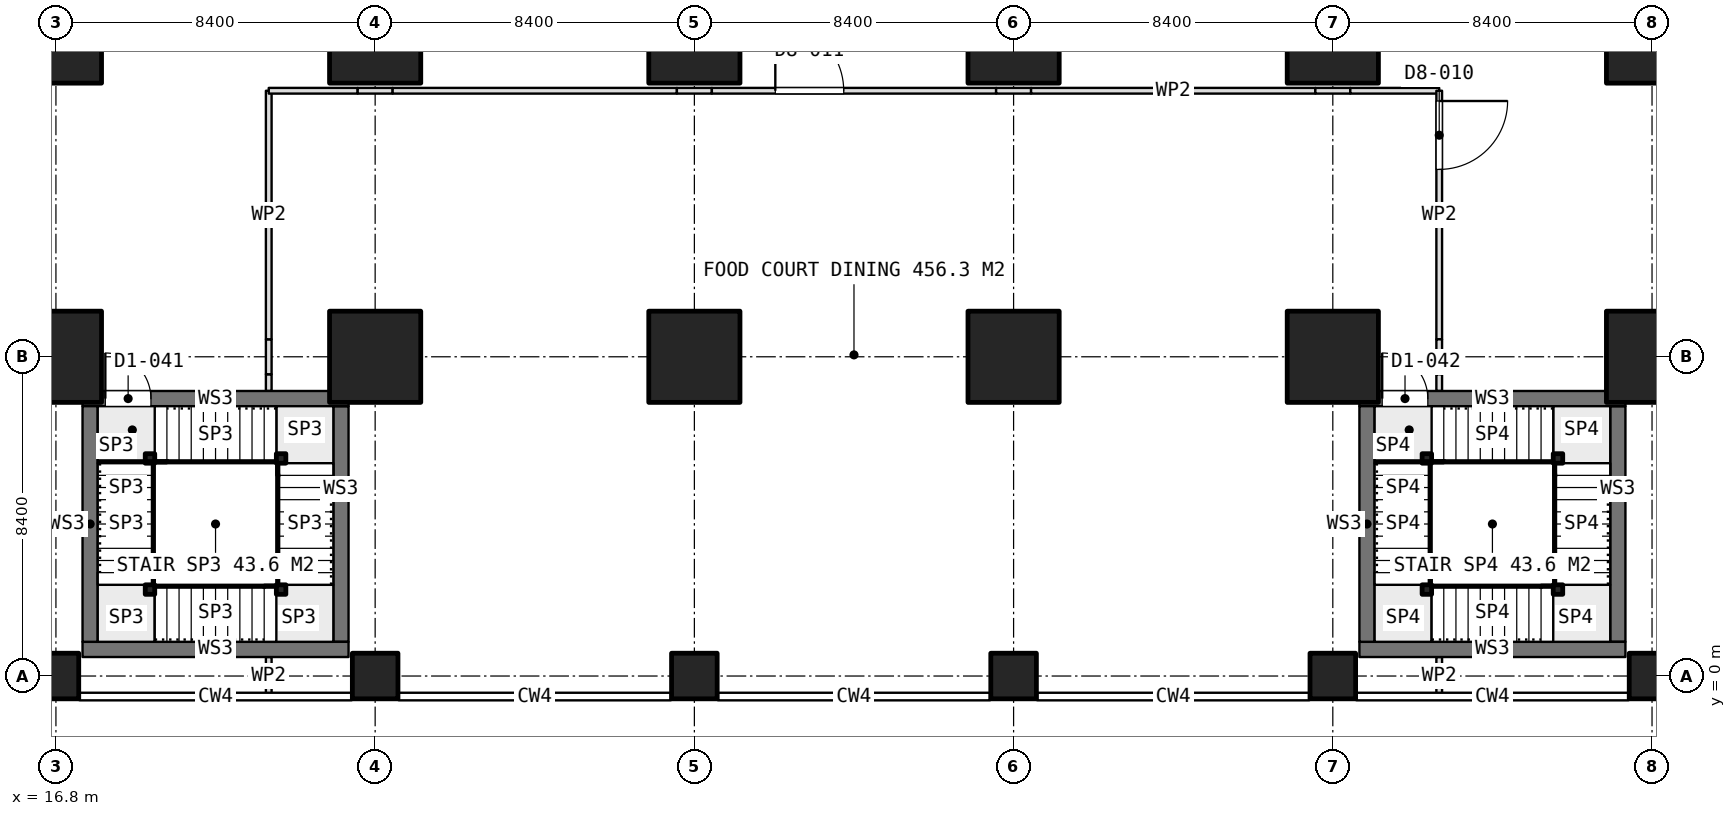
"""IFC4 building model, lengths in metres.
Left out: names, types, materials, properties, quantities, classifications, styles, units other than length and angle.
Written with IfcOpenShell. Run it as: python <this file> out.ifc"""

import sys

from ifc_helpers import new_model, si_unit, direction, frame, frame_2d, origin, origin_2d, place, context, subcontext, project, spatial, rectangle, extrude, element, fill, save


model = new_model("IFC4")
c1 = context("Model", 3, precision=1e-05, world=origin(), true_north=direction((0.0, 1.0)))
c2 = subcontext(c1, "Body", "Model", "MODEL_VIEW")
j1 = project(units=[si_unit("LENGTHUNIT", "METRE"), si_unit("PLANEANGLEUNIT", "RADIAN")], contexts=[c1])
p1 = place(None, origin())
s1 = spatial("IfcSite", under=j1, at=p1, CompositionType="ELEMENT")
p2 = place(p1, origin())
s2 = spatial("IfcBuilding", under=s1, at=p2, CompositionType="ELEMENT")
p3 = place(p2, frame((0.0, 0.0, 15.4)))
s3 = spatial("IfcBuildingStorey", under=s2, at=p3, CompositionType="ELEMENT", Elevation=15.4)
p4 = place(p3, frame((16.8, 0.0, 0.0), z_axis=(0.0, 0.0, 1.0), x_axis=(1.0, 0.0, 0.0)))
e1 = element("IfcColumn", 1, at=p4, inside=s3, PredefinedType="COLUMN", context=c2, shape_type="SweptSolid", body=[
    extrude(rectangle(XDim=1.2, YDim=1.2, at=origin_2d()), origin(), (0.0, 0.0, 1.0), 5.0),
])
for number, where, z_axis, x_axis in (
    (2, (16.8, 8.4, 0.0), (0.0, 0.0, 1.0), (1.0, 0.0, 0.0)),
    (3, (16.8, 16.8, 0.0), (0.0, 0.0, 1.0), (1.0, 0.0, 0.0)),
):
    element("IfcColumn", number, at=place(p3, frame(where, z_axis=z_axis, x_axis=x_axis)), inside=s3, PredefinedType="COLUMN", context=c2, shape_type="SweptSolid", body=[
        extrude(rectangle(XDim=2.4, YDim=2.4, at=origin_2d()), origin(), (0.0, 0.0, 1.0), 5.0),
    ])
p5 = place(p3, frame((25.2, 0.0, 0.0), z_axis=(0.0, 0.0, 1.0), x_axis=(1.0, 0.0, 0.0)))
e4 = element("IfcColumn", 4, at=p5, inside=s3, PredefinedType="COLUMN", context=c2, shape_type="SweptSolid", body=[
    extrude(rectangle(XDim=1.2, YDim=1.2, at=origin_2d()), origin(), (0.0, 0.0, 1.0), 5.0),
])
for number, where, z_axis, x_axis in (
    (5, (25.2, 8.4, 0.0), (0.0, 0.0, 1.0), (1.0, 0.0, 0.0)),
    (6, (25.2, 16.8, 0.0), (0.0, 0.0, 1.0), (1.0, 0.0, 0.0)),
):
    element("IfcColumn", number, at=place(p3, frame(where, z_axis=z_axis, x_axis=x_axis)), inside=s3, PredefinedType="COLUMN", context=c2, shape_type="SweptSolid", body=[
        extrude(rectangle(XDim=2.4, YDim=2.4, at=origin_2d()), origin(), (0.0, 0.0, 1.0), 5.0),
    ])
p6 = place(p3, frame((33.6, 0.0, 0.0), z_axis=(0.0, 0.0, 1.0), x_axis=(1.0, 0.0, 0.0)))
e7 = element("IfcColumn", 7, at=p6, inside=s3, PredefinedType="COLUMN", context=c2, shape_type="SweptSolid", body=[
    extrude(rectangle(XDim=1.2, YDim=1.2, at=origin_2d()), origin(), (0.0, 0.0, 1.0), 5.0),
])
for number, where, z_axis, x_axis in (
    (8, (33.6, 8.4, 0.0), (0.0, 0.0, 1.0), (1.0, 0.0, 0.0)),
    (9, (33.6, 16.8, 0.0), (0.0, 0.0, 1.0), (1.0, 0.0, 0.0)),
):
    element("IfcColumn", number, at=place(p3, frame(where, z_axis=z_axis, x_axis=x_axis)), inside=s3, PredefinedType="COLUMN", context=c2, shape_type="SweptSolid", body=[
        extrude(rectangle(XDim=2.4, YDim=2.4, at=origin_2d()), origin(), (0.0, 0.0, 1.0), 5.0),
    ])
p7 = place(p3, frame((42.0, 0.0, 0.0), z_axis=(0.0, 0.0, 1.0), x_axis=(1.0, 0.0, 0.0)))
e10 = element("IfcColumn", 10, at=p7, inside=s3, PredefinedType="COLUMN", context=c2, shape_type="SweptSolid", body=[
    extrude(rectangle(XDim=1.2, YDim=1.2, at=origin_2d()), origin(), (0.0, 0.0, 1.0), 5.0),
])
for number, where, z_axis, x_axis in (
    (11, (42.0, 8.4, 0.0), (0.0, 0.0, 1.0), (1.0, 0.0, 0.0)),
    (12, (42.0, 16.8, 0.0), (0.0, 0.0, 1.0), (1.0, 0.0, 0.0)),
):
    element("IfcColumn", number, at=place(p3, frame(where, z_axis=z_axis, x_axis=x_axis)), inside=s3, PredefinedType="COLUMN", context=c2, shape_type="SweptSolid", body=[
        extrude(rectangle(XDim=2.4, YDim=2.4, at=origin_2d()), origin(), (0.0, 0.0, 1.0), 5.0),
    ])
p8 = place(p3, frame((50.4, 0.0, 0.0), z_axis=(0.0, 0.0, 1.0), x_axis=(1.0, 0.0, 0.0)))
e13 = element("IfcColumn", 13, at=p8, inside=s3, PredefinedType="COLUMN", context=c2, shape_type="SweptSolid", body=[
    extrude(rectangle(XDim=1.2, YDim=1.2, at=origin_2d()), origin(), (0.0, 0.0, 1.0), 5.0),
])
for number, where, z_axis, x_axis in (
    (14, (50.4, 8.4, 0.0), (0.0, 0.0, 1.0), (1.0, 0.0, 0.0)),
    (15, (50.4, 16.8, 0.0), (0.0, 0.0, 1.0), (1.0, 0.0, 0.0)),
):
    element("IfcColumn", number, at=place(p3, frame(where, z_axis=z_axis, x_axis=x_axis)), inside=s3, PredefinedType="COLUMN", context=c2, shape_type="SweptSolid", body=[
        extrude(rectangle(XDim=2.4, YDim=2.4, at=origin_2d()), origin(), (0.0, 0.0, 1.0), 5.0),
    ])
p9 = place(p3, frame((58.8, 0.0, 0.0), z_axis=(0.0, 0.0, 1.0), x_axis=(1.0, 0.0, 0.0)))
e16 = element("IfcColumn", 16, at=p9, inside=s3, PredefinedType="COLUMN", context=c2, shape_type="SweptSolid", body=[
    extrude(rectangle(XDim=1.2, YDim=1.2, at=origin_2d()), origin(), (0.0, 0.0, 1.0), 5.0),
])
for number, where, z_axis, x_axis in (
    (17, (58.8, 8.4, 0.0), (0.0, 0.0, 1.0), (1.0, 0.0, 0.0)),
    (18, (58.8, 16.8, 0.0), (0.0, 0.0, 1.0), (1.0, 0.0, 0.0)),
):
    element("IfcColumn", number, at=place(p3, frame(where, z_axis=z_axis, x_axis=x_axis)), inside=s3, PredefinedType="COLUMN", context=c2, shape_type="SweptSolid", body=[
        extrude(rectangle(XDim=2.4, YDim=2.4, at=origin_2d()), origin(), (0.0, 0.0, 1.0), 5.0),
    ])
p10 = place(p3, frame((17.5, 0.7, 0.0), z_axis=(0.0, 0.0, 1.0), x_axis=(1.0, 0.0, 0.0)))
e19 = element("IfcWall", 19, at=p10, inside=s3, PredefinedType="SOLIDWALL", context=c2, shape_type="SweptSolid", body=[
    extrude(rectangle(XDim=7.0, YDim=0.4, at=frame_2d((3.5, 0.0))), origin(), (0.0, 0.0, 1.0), 4.7),
])
p11 = place(p3, frame((17.5, 7.3, 0.0), z_axis=(0.0, 0.0, 1.0), x_axis=(1.0, 0.0, 0.0)))
e20 = element("IfcWall", 20, at=p11, inside=s3, PredefinedType="SOLIDWALL", context=c2, shape_type="SweptSolid", body=[
    extrude(rectangle(XDim=7.0, YDim=0.4, at=frame_2d((3.5, 0.0))), origin(), (0.0, 0.0, 1.0), 4.7),
])
p12 = place(p11, frame((0.6, 0.0, 0.0)))
e21 = element("IfcOpeningElement", 21, at=p12, cuts=e20, PredefinedType="OPENING", context=c2, shape_type="SweptSolid", body=[
    extrude(rectangle(XDim=1.2, YDim=2.1, at=frame_2d((0.6, 1.05))), frame((0.0, 0.21, 0.0), z_axis=(0.0, -1.0, 0.0), x_axis=(1.0, 0.0, 0.0)), (0.0, 0.0, 1.0), 0.42),
])
for number, where, z_axis, x_axis in (
    (22, (17.7, 0.9, 0.0), (0.0, 0.0, 1.0), (0.0, 1.0, 0.0)),
    (23, (24.3, 0.9, 0.0), (0.0, 0.0, 1.0), (0.0, 1.0, 0.0)),
):
    element("IfcWall", number, at=place(p3, frame(where, z_axis=z_axis, x_axis=x_axis)), inside=s3, PredefinedType="SOLIDWALL", context=c2, shape_type="SweptSolid", body=[
        extrude(rectangle(XDim=6.2, YDim=0.4, at=frame_2d((3.1, 0.0))), origin(), (0.0, 0.0, 1.0), 4.7),
    ])
p13 = place(p3, frame((51.1, 0.7, 0.0), z_axis=(0.0, 0.0, 1.0), x_axis=(1.0, 0.0, 0.0)))
e24 = element("IfcWall", 24, at=p13, inside=s3, PredefinedType="SOLIDWALL", context=c2, shape_type="SweptSolid", body=[
    extrude(rectangle(XDim=7.0, YDim=0.4, at=frame_2d((3.5, 0.0))), origin(), (0.0, 0.0, 1.0), 4.7),
])
p14 = place(p3, frame((51.1, 7.3, 0.0), z_axis=(0.0, 0.0, 1.0), x_axis=(1.0, 0.0, 0.0)))
e25 = element("IfcWall", 25, at=p14, inside=s3, PredefinedType="SOLIDWALL", context=c2, shape_type="SweptSolid", body=[
    extrude(rectangle(XDim=7.0, YDim=0.4, at=frame_2d((3.5, 0.0))), origin(), (0.0, 0.0, 1.0), 4.7),
])
p15 = place(p14, frame((0.6, 0.0, 0.0)))
e26 = element("IfcOpeningElement", 26, at=p15, cuts=e25, PredefinedType="OPENING", context=c2, shape_type="SweptSolid", body=[
    extrude(rectangle(XDim=1.2, YDim=2.1, at=frame_2d((0.6, 1.05))), frame((0.0, 0.21, 0.0), z_axis=(0.0, -1.0, 0.0), x_axis=(1.0, 0.0, 0.0)), (0.0, 0.0, 1.0), 0.42),
])
for number, where, z_axis, x_axis in (
    (27, (51.3, 0.9, 0.0), (0.0, 0.0, 1.0), (0.0, 1.0, 0.0)),
    (28, (57.9, 0.9, 0.0), (0.0, 0.0, 1.0), (0.0, 1.0, 0.0)),
):
    element("IfcWall", number, at=place(p3, frame(where, z_axis=z_axis, x_axis=x_axis)), inside=s3, PredefinedType="SOLIDWALL", context=c2, shape_type="SweptSolid", body=[
        extrude(rectangle(XDim=6.2, YDim=0.4, at=frame_2d((3.1, 0.0))), origin(), (0.0, 0.0, 1.0), 4.7),
    ])
p16 = place(p3, frame((22.4, 7.5, 0.0), z_axis=(0.0, 0.0, 1.0), x_axis=(0.0, 1.0, 0.0)))
e29 = element("IfcWall", 29, at=p16, inside=s3, PredefinedType="PARTITIONING", context=c2, shape_type="SweptSolid", body=[
    extrude(rectangle(XDim=0.44, YDim=0.15, at=frame_2d((0.22, 0.0))), origin(), (0.0, 0.0, 1.0), 4.7),
])
p17 = place(p3, frame((22.4, 7.94, 0.0), z_axis=(0.0, 0.0, 1.0), x_axis=(0.0, 1.0, 0.0)))
e30 = element("IfcWall", 30, at=p17, inside=s3, PredefinedType="PARTITIONING", context=c2, shape_type="SweptSolid", body=[
    extrude(rectangle(XDim=0.92, YDim=0.15, at=frame_2d((0.46, 0.0))), origin(), (0.0, 0.0, 1.0), 2.9),
])
p18 = place(p3, frame((22.4, 8.86, 0.0), z_axis=(0.0, 0.0, 1.0), x_axis=(0.0, 1.0, 0.0)))
e31 = element("IfcWall", 31, at=p18, inside=s3, PredefinedType="PARTITIONING", context=c2, shape_type="SweptSolid", body=[
    extrude(rectangle(XDim=6.54, YDim=0.15, at=frame_2d((3.27, 0.0))), origin(), (0.0, 0.0, 1.0), 4.7),
])
p19 = place(p3, frame((22.4, 15.4, 0.0), z_axis=(0.0, 0.0, 1.0), x_axis=(1.0, 0.0, 0.0)))
e32 = element("IfcWall", 32, at=p19, inside=s3, PredefinedType="PARTITIONING", context=c2, shape_type="SweptSolid", body=[
    extrude(rectangle(XDim=2.34, YDim=0.15, at=frame_2d((1.17, 0.0))), origin(), (0.0, 0.0, 1.0), 4.7),
])
p20 = place(p3, frame((24.74, 15.4, 0.0), z_axis=(0.0, 0.0, 1.0), x_axis=(1.0, 0.0, 0.0)))
e33 = element("IfcWall", 33, at=p20, inside=s3, PredefinedType="PARTITIONING", context=c2, shape_type="SweptSolid", body=[
    extrude(rectangle(XDim=0.92, YDim=0.15, at=frame_2d((0.46, 0.0))), origin(), (0.0, 0.0, 1.0), 2.9),
])
p21 = place(p3, frame((25.66, 15.4, 0.0), z_axis=(0.0, 0.0, 1.0), x_axis=(1.0, 0.0, 0.0)))
e34 = element("IfcWall", 34, at=p21, inside=s3, PredefinedType="PARTITIONING", context=c2, shape_type="SweptSolid", body=[
    extrude(rectangle(XDim=7.48, YDim=0.15, at=frame_2d((3.74, 0.0))), origin(), (0.0, 0.0, 1.0), 4.7),
])
p22 = place(p3, frame((33.14, 15.4, 0.0), z_axis=(0.0, 0.0, 1.0), x_axis=(1.0, 0.0, 0.0)))
e35 = element("IfcWall", 35, at=p22, inside=s3, PredefinedType="PARTITIONING", context=c2, shape_type="SweptSolid", body=[
    extrude(rectangle(XDim=0.92, YDim=0.15, at=frame_2d((0.46, 0.0))), origin(), (0.0, 0.0, 1.0), 2.9),
])
p23 = place(p3, frame((34.06, 15.4, 0.0), z_axis=(0.0, 0.0, 1.0), x_axis=(1.0, 0.0, 0.0)))
e36 = element("IfcWall", 36, at=p23, inside=s3, PredefinedType="PARTITIONING", context=c2, shape_type="SweptSolid", body=[
    extrude(rectangle(XDim=7.48, YDim=0.15, at=frame_2d((3.74, 0.0))), origin(), (0.0, 0.0, 1.0), 4.7),
])
p24 = place(p23, frame((1.67, 0.0, 0.0)))
e37 = element("IfcOpeningElement", 37, at=p24, cuts=e36, PredefinedType="OPENING", context=c2, shape_type="SweptSolid", body=[
    extrude(rectangle(XDim=1.8, YDim=2.1, at=frame_2d((0.9, 1.05))), frame((0.0, 0.085, 0.0), z_axis=(0.0, -1.0, 0.0), x_axis=(1.0, 0.0, 0.0)), (0.0, 0.0, 1.0), 0.17),
])
p25 = place(p3, frame((41.54, 15.4, 0.0), z_axis=(0.0, 0.0, 1.0), x_axis=(1.0, 0.0, 0.0)))
e38 = element("IfcWall", 38, at=p25, inside=s3, PredefinedType="PARTITIONING", context=c2, shape_type="SweptSolid", body=[
    extrude(rectangle(XDim=0.92, YDim=0.15, at=frame_2d((0.46, 0.0))), origin(), (0.0, 0.0, 1.0), 2.9),
])
p26 = place(p3, frame((42.46, 15.4, 0.0), z_axis=(0.0, 0.0, 1.0), x_axis=(1.0, 0.0, 0.0)))
e39 = element("IfcWall", 39, at=p26, inside=s3, PredefinedType="PARTITIONING", context=c2, shape_type="SweptSolid", body=[
    extrude(rectangle(XDim=7.48, YDim=0.15, at=frame_2d((3.74, 0.0))), origin(), (0.0, 0.0, 1.0), 4.7),
])
p27 = place(p3, frame((49.94, 15.4, 0.0), z_axis=(0.0, 0.0, 1.0), x_axis=(1.0, 0.0, 0.0)))
e40 = element("IfcWall", 40, at=p27, inside=s3, PredefinedType="PARTITIONING", context=c2, shape_type="SweptSolid", body=[
    extrude(rectangle(XDim=0.92, YDim=0.15, at=frame_2d((0.46, 0.0))), origin(), (0.0, 0.0, 1.0), 2.9),
])
p28 = place(p3, frame((50.86, 15.4, 0.0), z_axis=(0.0, 0.0, 1.0), x_axis=(1.0, 0.0, 0.0)))
e41 = element("IfcWall", 41, at=p28, inside=s3, PredefinedType="PARTITIONING", context=c2, shape_type="SweptSolid", body=[
    extrude(rectangle(XDim=2.34, YDim=0.15, at=frame_2d((1.17, 0.0))), origin(), (0.0, 0.0, 1.0), 4.7),
])
p29 = place(p3, frame((53.2, 15.4, 0.0), z_axis=(0.0, 0.0, 1.0), x_axis=(0.0, -1.0, 0.0)))
e42 = element("IfcWall", 42, at=p29, inside=s3, PredefinedType="PARTITIONING", context=c2, shape_type="SweptSolid", body=[
    extrude(rectangle(XDim=6.54, YDim=0.15, at=frame_2d((3.27, 0.0))), origin(), (0.0, 0.0, 1.0), 4.7),
])
p30 = place(p29, frame((0.27, 0.0, 0.0)))
e43 = element("IfcOpeningElement", 43, at=p30, cuts=e42, PredefinedType="OPENING", context=c2, shape_type="SweptSolid", body=[
    extrude(rectangle(XDim=1.8, YDim=2.1, at=frame_2d((0.9, 1.05))), frame((0.0, 0.085, 0.0), z_axis=(0.0, -1.0, 0.0), x_axis=(1.0, 0.0, 0.0)), (0.0, 0.0, 1.0), 0.17),
])
p31 = place(p3, frame((53.2, 8.86, 0.0), z_axis=(0.0, 0.0, 1.0), x_axis=(0.0, -1.0, 0.0)))
e44 = element("IfcWall", 44, at=p31, inside=s3, PredefinedType="PARTITIONING", context=c2, shape_type="SweptSolid", body=[
    extrude(rectangle(XDim=0.92, YDim=0.15, at=frame_2d((0.46, 0.0))), origin(), (0.0, 0.0, 1.0), 2.9),
])
p32 = place(p3, frame((53.2, 7.94, 0.0), z_axis=(0.0, 0.0, 1.0), x_axis=(0.0, -1.0, 0.0)))
e45 = element("IfcWall", 45, at=p32, inside=s3, PredefinedType="PARTITIONING", context=c2, shape_type="SweptSolid", body=[
    extrude(rectangle(XDim=0.44, YDim=0.15, at=frame_2d((0.22, 0.0))), origin(), (0.0, 0.0, 1.0), 4.7),
])
for number, where, z_axis, x_axis in (
    (46, (53.2, 0.5, 0.0), (0.0, 0.0, 1.0), (0.0, -1.0, 0.0)),
    (47, (22.4, -0.49, 0.0), (0.0, 0.0, 1.0), (0.0, 1.0, 0.0)),
):
    element("IfcWall", number, at=place(p3, frame(where, z_axis=z_axis, x_axis=x_axis)), inside=s3, PredefinedType="PARTITIONING", context=c2, shape_type="SweptSolid", body=[
        extrude(rectangle(XDim=0.99, YDim=0.15, at=frame_2d((0.495, 0.0))), origin(), (0.0, 0.0, 1.0), 2.9),
    ])
for number, where, z_axis, x_axis in (
    (48, (19.275, 5.725, 0.0), (0.0, 0.0, 1.0), (1.0, 0.0, 0.0)),
    (49, (19.275, 2.275, 0.0), (0.0, 0.0, 1.0), (1.0, 0.0, 0.0)),
    (50, (22.725, 2.275, 0.0), (0.0, 0.0, 1.0), (1.0, 0.0, 0.0)),
    (51, (22.725, 5.725, 0.0), (0.0, 0.0, 1.0), (1.0, 0.0, 0.0)),
    (52, (52.875, 5.725, 0.0), (0.0, 0.0, 1.0), (1.0, 0.0, 0.0)),
    (53, (52.875, 2.275, 0.0), (0.0, 0.0, 1.0), (1.0, 0.0, 0.0)),
    (54, (56.325, 2.275, 0.0), (0.0, 0.0, 1.0), (1.0, 0.0, 0.0)),
    (55, (56.325, 5.725, 0.0), (0.0, 0.0, 1.0), (1.0, 0.0, 0.0)),
):
    element("IfcColumn", number, at=place(p3, frame(where, z_axis=z_axis, x_axis=x_axis)), inside=s3, PredefinedType="COLUMN", context=c2, shape_type="SweptSolid", body=[
        extrude(rectangle(XDim=0.25, YDim=0.25, at=origin_2d()), origin(), (0.0, 0.0, 1.0), 5.0),
    ])
p33 = place(p24, origin())
e56 = element("IfcDoor", 56, at=p33, inside=s3, OperationType="DOUBLE_DOOR_SINGLE_SWING", PredefinedType="DOOR", context=c2, shape_type="SweptSolid", body=[
    extrude(rectangle(XDim=1.8, YDim=2.1, at=frame_2d((0.9, 1.05))), frame((0.0, 0.025, 0.0), z_axis=(0.0, -1.0, 0.0), x_axis=(1.0, 0.0, 0.0)), (0.0, 0.0, 1.0), 0.05),
])
fill(e37, e56)
p34 = place(p30, origin())
e57 = element("IfcDoor", 57, at=p34, inside=s3, OperationType="DOUBLE_DOOR_SINGLE_SWING", PredefinedType="DOOR", context=c2, shape_type="SweptSolid", body=[
    extrude(rectangle(XDim=1.8, YDim=2.1, at=frame_2d((0.9, 1.05))), frame((0.0, 0.025, 0.0), z_axis=(0.0, -1.0, 0.0), x_axis=(1.0, 0.0, 0.0)), (0.0, 0.0, 1.0), 0.05),
])
fill(e43, e57)
p35 = place(p12, origin())
e58 = element("IfcDoor", 58, at=p35, inside=s3, OperationType="SINGLE_SWING_RIGHT", PredefinedType="DOOR", context=c2, shape_type="SweptSolid", body=[
    extrude(rectangle(XDim=1.2, YDim=2.1, at=frame_2d((0.6, 1.05))), frame((0.0, 0.025, 0.0), z_axis=(0.0, -1.0, 0.0), x_axis=(1.0, 0.0, 0.0)), (0.0, 0.0, 1.0), 0.05),
])
fill(e21, e58)
p36 = place(p15, origin())
e59 = element("IfcDoor", 59, at=p36, inside=s3, OperationType="SINGLE_SWING_RIGHT", PredefinedType="DOOR", context=c2, shape_type="SweptSolid", body=[
    extrude(rectangle(XDim=1.2, YDim=2.1, at=frame_2d((0.6, 1.05))), frame((0.0, 0.025, 0.0), z_axis=(0.0, -1.0, 0.0), x_axis=(1.0, 0.0, 0.0)), (0.0, 0.0, 1.0), 0.05),
])
fill(e26, e59)
save(model, sys.argv[1])
